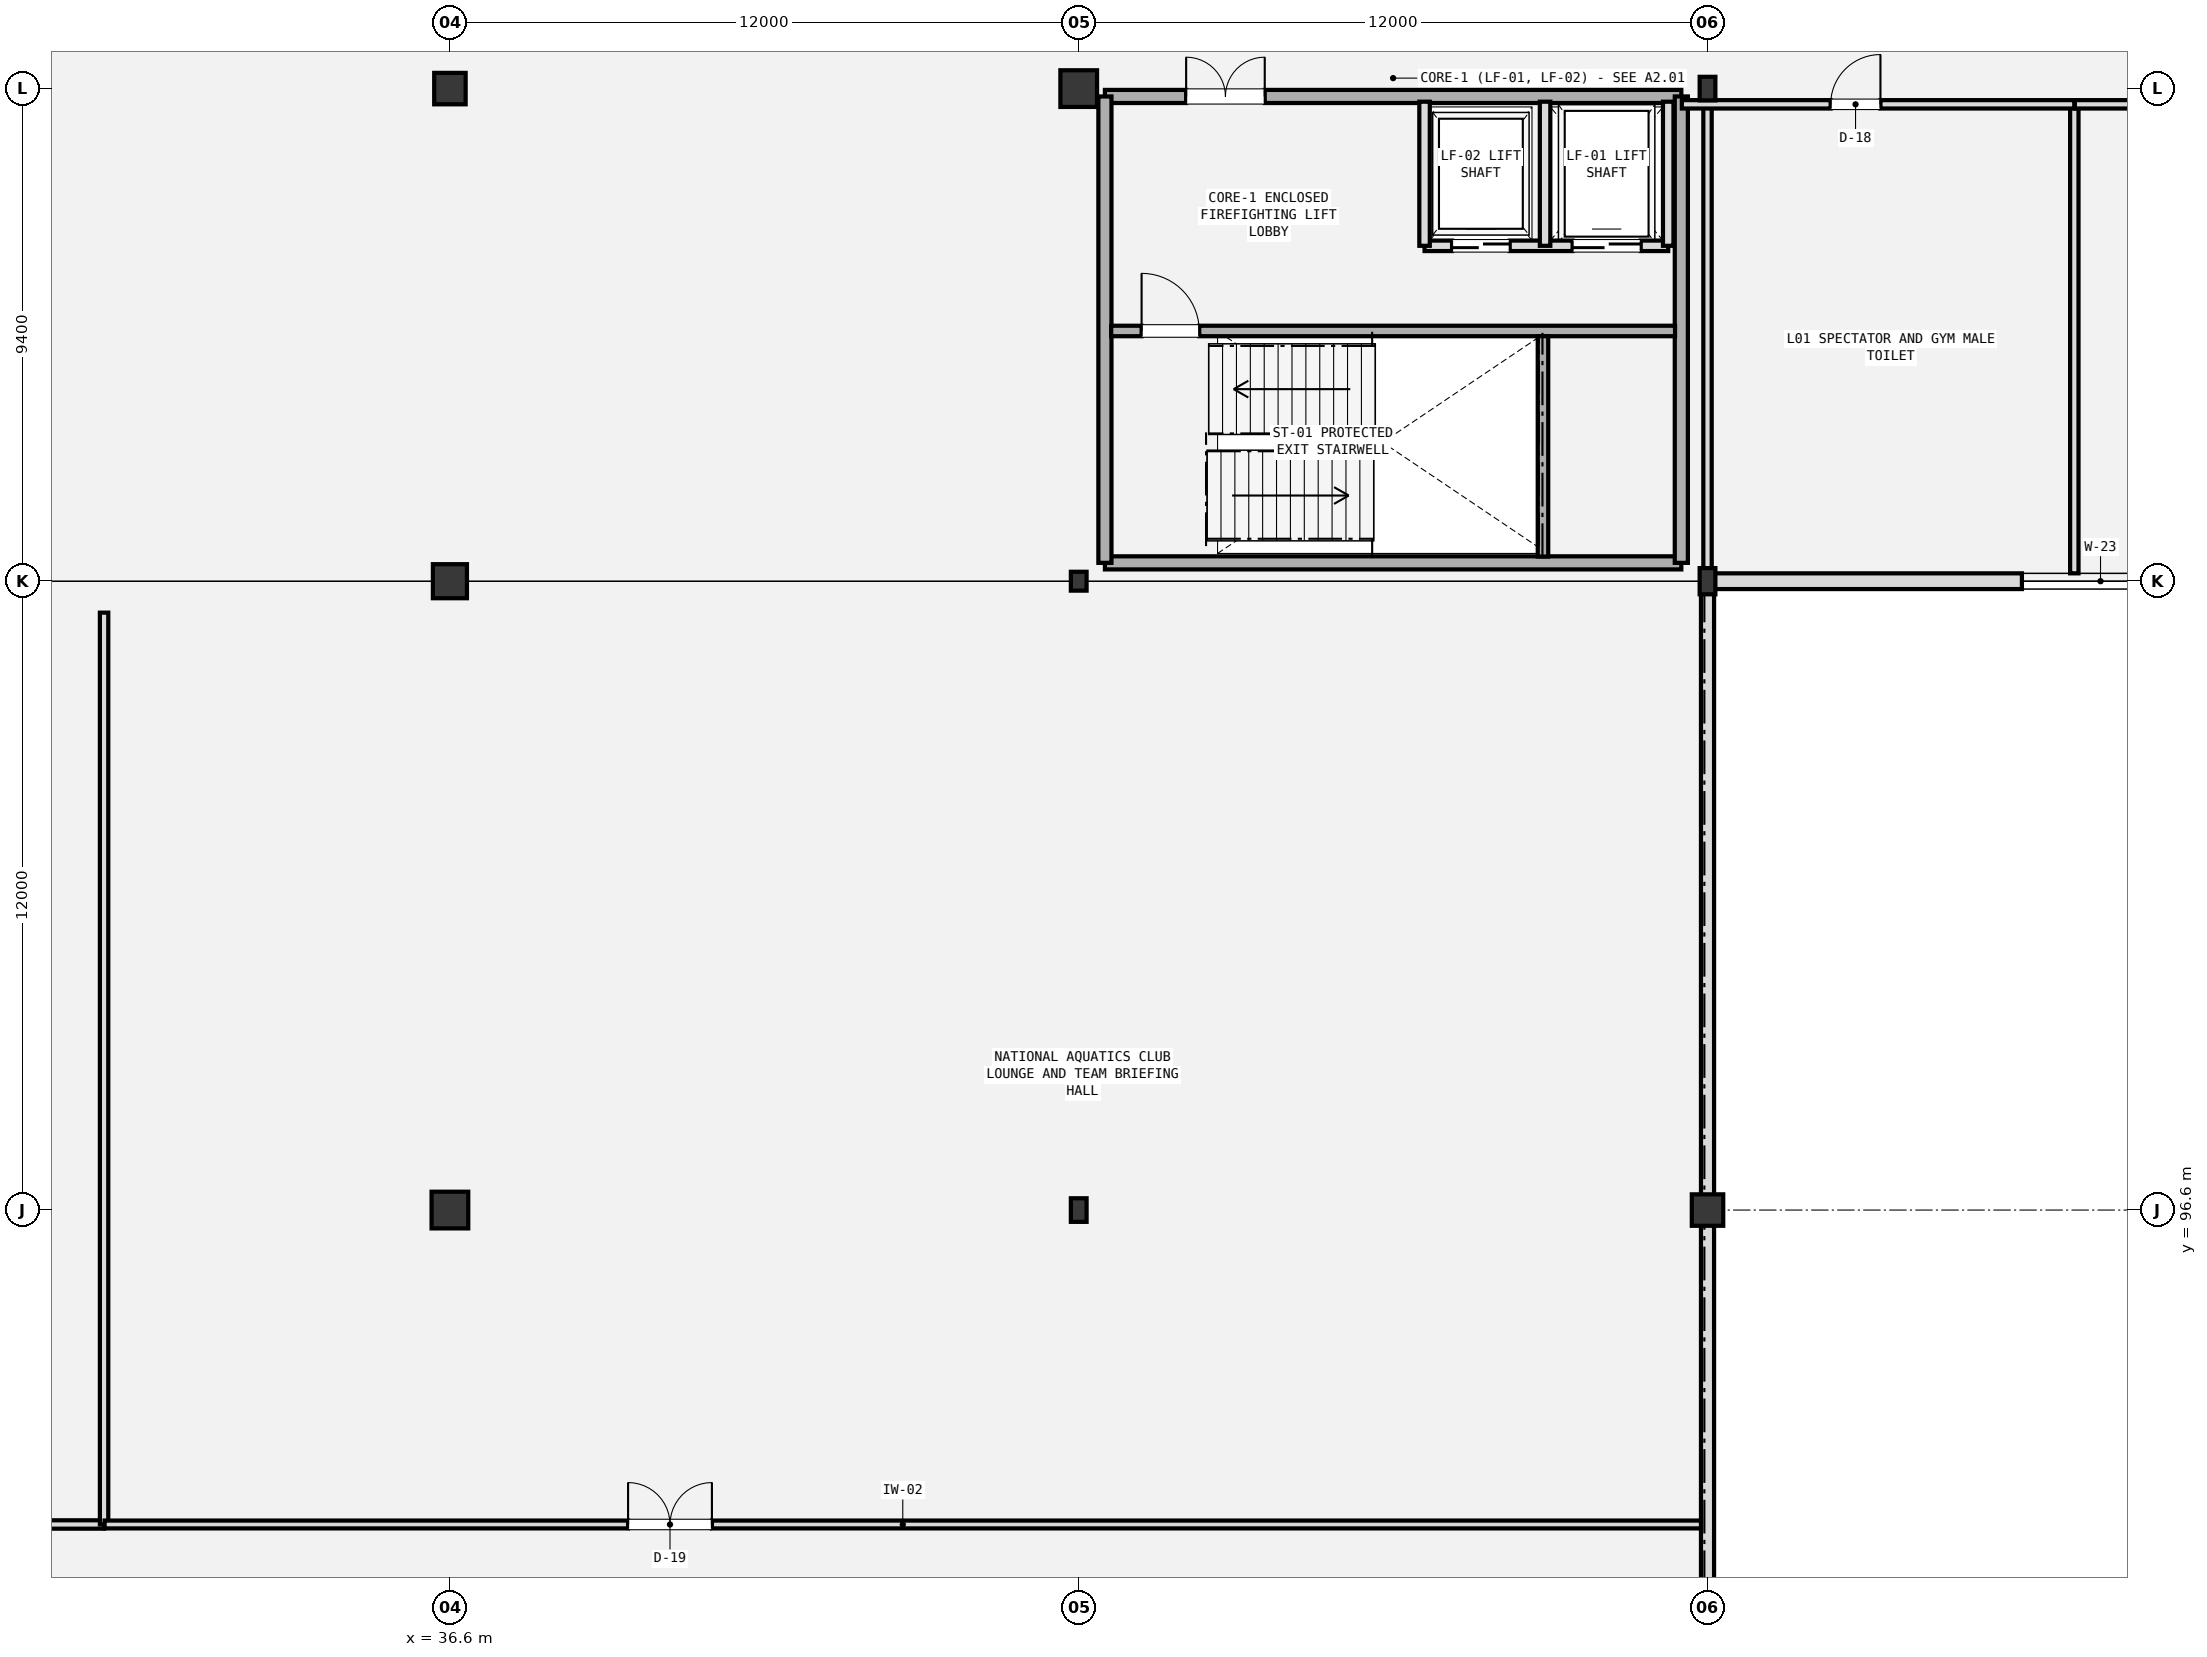
"""IFC4 building model, lengths in metres.
Left out: names, types, materials, properties, quantities, classifications, styles, units other than length and angle.
Written with IfcOpenShell. Run it as: python <this file> out.ifc"""

import sys

from ifc_helpers import new_model, si_unit, direction, frame, frame_2d, origin, origin_2d, place, context, subcontext, project, spatial, rectangle, i_section, extrude, element, fill, save


model = new_model("IFC4")
c1 = context("Model", 3, precision=1e-05, world=origin(), true_north=direction((0.0, 1.0)))
c2 = subcontext(c1, "Body", "Model", "MODEL_VIEW")
j1 = project(units=[si_unit("LENGTHUNIT", "METRE"), si_unit("PLANEANGLEUNIT", "RADIAN")], contexts=[c1])
p1 = place(None, origin())
s1 = spatial("IfcSite", under=j1, at=p1, CompositionType="ELEMENT")
p2 = place(p1, origin())
s2 = spatial("IfcBuilding", under=s1, at=p2, CompositionType="ELEMENT")
p3 = place(p2, frame((0.0, 0.0, 5.4)))
s3 = spatial("IfcBuildingStorey", under=s2, at=p3, CompositionType="ELEMENT", Elevation=5.4)
p4 = place(p3, frame((36.6, 96.6, 0.0), z_axis=(0.0, 0.0, 1.0), x_axis=(1.0, 0.0, 0.0)))
e1 = element("IfcColumn", 1, at=p4, inside=s3, PredefinedType="COLUMN", context=c2, shape_type="SweptSolid", body=[
    extrude(rectangle(XDim=0.7, YDim=0.7, at=origin_2d()), origin(), (0.0, 0.0, 1.0), 4.56),
])
p5 = place(p3, frame((36.6, 108.6, 0.0), z_axis=(0.0, 0.0, 1.0), x_axis=(1.0, 0.0, 0.0)))
e2 = element("IfcColumn", 2, at=p5, inside=s3, PredefinedType="COLUMN", context=c2, shape_type="SweptSolid", body=[
    extrude(rectangle(XDim=0.65, YDim=0.65, at=origin_2d()), origin(), (0.0, 0.0, 1.0), 4.2),
])
p6 = place(p3, frame((36.6, 118.0, 0.0), z_axis=(0.0, 0.0, 1.0), x_axis=(1.0, 0.0, 0.0)))
e3 = element("IfcColumn", 3, at=p6, inside=s3, PredefinedType="COLUMN", context=c2, shape_type="SweptSolid", body=[
    extrude(rectangle(XDim=0.6, YDim=0.6, at=origin_2d()), origin(), (0.0, 0.0, 1.0), 4.2),
])
p7 = place(p3, frame((48.6, 96.6, 0.0), z_axis=(0.0, 0.0, 1.0), x_axis=(1.0, 0.0, 0.0)))
e4 = element("IfcColumn", 4, at=p7, inside=s3, PredefinedType="COLUMN", context=c2, shape_type="SweptSolid", body=[
    extrude(i_section(OverallWidth=0.3, OverallDepth=0.45, WebThickness=0.014, FlangeThickness=0.026, FilletRadius=0.027, at=origin_2d()), origin(), (0.0, 0.0, 1.0), 4.56),
])
p8 = place(p3, frame((48.6, 108.6, 0.0), z_axis=(0.0, 0.0, 1.0), x_axis=(1.0, 0.0, 0.0)))
e5 = element("IfcColumn", 5, at=p8, inside=s3, PredefinedType="PILASTER", context=c2, shape_type="SweptSolid", body=[
    extrude(i_section(OverallWidth=0.3, OverallDepth=0.36, WebThickness=0.012, FlangeThickness=0.022, FilletRadius=0.027, at=origin_2d()), origin(), (0.0, 0.0, 1.0), 4.2),
])
p9 = place(p3, frame((48.6, 118.0, 0.0), z_axis=(0.0, 0.0, 1.0), x_axis=(1.0, 0.0, 0.0)))
e6 = element("IfcColumn", 6, at=p9, inside=s3, PredefinedType="COLUMN", context=c2, shape_type="SweptSolid", body=[
    extrude(rectangle(XDim=0.7, YDim=0.7, at=origin_2d()), origin(), (0.0, 0.0, 1.0), 4.2),
])
p10 = place(p3, frame((60.6, 96.6, 0.0), z_axis=(0.0, 0.0, 1.0), x_axis=(1.0, 0.0, 0.0)))
e7 = element("IfcColumn", 7, at=p10, inside=s3, PredefinedType="COLUMN", context=c2, shape_type="SweptSolid", body=[
    extrude(rectangle(XDim=0.6, YDim=0.6, at=origin_2d()), origin(), (0.0, 0.0, 1.0), 4.56),
])
p11 = place(p3, frame((60.6, 108.6, 0.0), z_axis=(0.0, 0.0, 1.0), x_axis=(1.0, 0.0, 0.0)))
e8 = element("IfcColumn", 8, at=p11, inside=s3, PredefinedType="COLUMN", context=c2, shape_type="SweptSolid", body=[
    extrude(i_section(OverallWidth=0.3, OverallDepth=0.5, WebThickness=0.014, FlangeThickness=0.028, FilletRadius=0.027, at=origin_2d()), origin(), (0.0, 0.0, 1.0), 4.2),
])
p12 = place(p3, frame((60.6, 118.0, 0.0), z_axis=(0.0, 0.0, 1.0), x_axis=(1.0, 0.0, 0.0)))
e9 = element("IfcColumn", 9, at=p12, inside=s3, PredefinedType="COLUMN", context=c2, shape_type="SweptSolid", body=[
    extrude(i_section(OverallWidth=0.3, OverallDepth=0.45, WebThickness=0.014, FlangeThickness=0.026, FilletRadius=0.027, at=origin_2d()), origin(), (0.0, 0.0, 1.0), 4.2),
])
p13 = place(p3, frame((60.6, 108.6, 0.0), z_axis=(0.0, 0.0, 1.0), x_axis=(1.0, 0.0, 0.0)))
e10 = element("IfcWall", 10, at=p13, inside=s3, PredefinedType="SOLIDWALL", context=c2, shape_type="SweptSolid", body=[
    extrude(rectangle(XDim=95.4, YDim=0.3, at=frame_2d((47.7, 0.0))), origin(), (0.0, 0.0, 1.0), 3.43),
])
p14 = place(p13, frame((6.0, 0.0, 0.85)))
e11 = element("IfcOpeningElement", 11, at=p14, cuts=e10, PredefinedType="OPENING", context=c2, shape_type="SweptSolid", body=[
    extrude(rectangle(XDim=3.0, YDim=1.65, at=frame_2d((1.5, 0.825))), frame((0.0, 0.16, 0.0), z_axis=(0.0, -1.0, 0.0), x_axis=(1.0, 0.0, 0.0)), (0.0, 0.0, 1.0), 0.32),
])
p15 = place(p13, frame((20.0, 0.0, 0.85)))
e12 = element("IfcOpeningElement", 12, at=p15, cuts=e10, PredefinedType="OPENING", context=c2, shape_type="SweptSolid", body=[
    extrude(rectangle(XDim=2.8, YDim=1.5, at=frame_2d((1.4, 0.75))), frame((0.0, 0.16, 0.0), z_axis=(0.0, -1.0, 0.0), x_axis=(1.0, 0.0, 0.0)), (0.0, 0.0, 1.0), 0.32),
])
p16 = place(p13, frame((54.0, 0.0, 0.85)))
e13 = element("IfcOpeningElement", 13, at=p16, cuts=e10, PredefinedType="OPENING", context=c2, shape_type="SweptSolid", body=[
    extrude(rectangle(XDim=4.4, YDim=1.4, at=frame_2d((2.2, 0.7))), frame((0.0, 0.16, 0.0), z_axis=(0.0, -1.0, 0.0), x_axis=(1.0, 0.0, 0.0)), (0.0, 0.0, 1.0), 0.32),
])
p17 = place(p13, frame((72.0, 0.0, 0.85)))
e14 = element("IfcOpeningElement", 14, at=p17, cuts=e10, PredefinedType="OPENING", context=c2, shape_type="SweptSolid", body=[
    extrude(rectangle(XDim=3.4, YDim=1.4, at=frame_2d((1.7, 0.7))), frame((0.0, 0.16, 0.0), z_axis=(0.0, -1.0, 0.0), x_axis=(1.0, 0.0, 0.0)), (0.0, 0.0, 1.0), 0.32),
])
p18 = place(p3, frame((60.6, 85.4, 4.88), z_axis=(0.0, 0.0, 1.0), x_axis=(0.0, 1.0, 0.0)))
e15 = element("IfcWall", 15, at=p18, inside=s3, PredefinedType="PARAPET", context=c2, shape_type="SweptSolid", body=[
    extrude(rectangle(XDim=23.2, YDim=0.25, at=frame_2d((11.6, 0.0))), origin(), (0.0, 0.0, 1.0), 1.15),
])
p19 = place(p3, frame((49.1, 108.95, 0.0), z_axis=(0.0, 0.0, 1.0), x_axis=(1.0, 0.0, 0.0)))
e16 = element("IfcWall", 16, at=p19, inside=s3, PredefinedType="SHEAR", context=c2, shape_type="SweptSolid", body=[
    extrude(rectangle(XDim=11.0, YDim=0.25, at=frame_2d((5.5, 0.0))), origin(), (0.0, 0.0, 1.0), 3.88),
])
p20 = place(p3, frame((49.1, 117.85, 0.0), z_axis=(0.0, 0.0, 1.0), x_axis=(1.0, 0.0, 0.0)))
e17 = element("IfcWall", 17, at=p20, inside=s3, PredefinedType="SHEAR", context=c2, shape_type="SweptSolid", body=[
    extrude(rectangle(XDim=11.0, YDim=0.25, at=frame_2d((5.5, 0.0))), origin(), (0.0, 0.0, 1.0), 3.88),
])
p21 = place(p20, frame((1.55, 0.0, 0.0)))
e18 = element("IfcOpeningElement", 18, at=p21, cuts=e17, PredefinedType="OPENING", context=c2, shape_type="SweptSolid", body=[
    extrude(rectangle(XDim=1.5, YDim=2.2, at=frame_2d((0.75, 1.1))), frame((0.0, 0.135, 0.0), z_axis=(0.0, -1.0, 0.0), x_axis=(1.0, 0.0, 0.0)), (0.0, 0.0, 1.0), 0.27),
])
for number, where, z_axis, x_axis in (
    (19, (49.1, 108.95, 0.0), (0.0, 0.0, 1.0), (0.0, 1.0, 0.0)),
    (20, (60.1, 108.95, 0.0), (0.0, 0.0, 1.0), (0.0, 1.0, 0.0)),
):
    element("IfcWall", number, at=place(p3, frame(where, z_axis=z_axis, x_axis=x_axis)), inside=s3, PredefinedType="SHEAR", context=c2, shape_type="SweptSolid", body=[
        extrude(rectangle(XDim=8.9, YDim=0.25, at=frame_2d((4.45, 0.0))), origin(), (0.0, 0.0, 1.0), 3.88),
    ])
p22 = place(p3, frame((49.22, 113.375, 0.0), z_axis=(0.0, 0.0, 1.0), x_axis=(1.0, 0.0, 0.0)))
e21 = element("IfcWall", 21, at=p22, inside=s3, PredefinedType="SHEAR", context=c2, shape_type="SweptSolid", body=[
    extrude(rectangle(XDim=10.76, YDim=0.2, at=frame_2d((5.38, 0.0))), origin(), (0.0, 0.0, 1.0), 3.88),
])
p23 = place(p22, frame((0.58, 0.0, 0.0)))
e22 = element("IfcOpeningElement", 22, at=p23, cuts=e21, PredefinedType="OPENING", context=c2, shape_type="SweptSolid", body=[
    extrude(rectangle(XDim=1.1, YDim=2.2, at=frame_2d((0.55, 1.1))), frame((0.0, 0.11, 0.0), z_axis=(0.0, -1.0, 0.0), x_axis=(1.0, 0.0, 0.0)), (0.0, 0.0, 1.0), 0.22),
])
p24 = place(p3, frame((57.46, 109.07, 0.0), z_axis=(0.0, 0.0, 1.0), x_axis=(0.0, 1.0, 0.0)))
e23 = element("IfcWall", 23, at=p24, inside=s3, PredefinedType="SHEAR", context=c2, shape_type="SweptSolid", body=[
    extrude(rectangle(XDim=4.205, YDim=0.2, at=frame_2d((2.103, 0.0))), origin(), (0.0, 0.0, 1.0), 3.88),
])
p25 = place(p3, frame((55.2, 115.0, 0.0), z_axis=(0.0, 0.0, 1.0), x_axis=(1.0, 0.0, 0.0)))
e24 = element("IfcWall", 24, at=p25, inside=s3, PredefinedType="SOLIDWALL", context=c2, shape_type="SweptSolid", body=[
    extrude(rectangle(XDim=4.65, YDim=0.2, at=frame_2d((2.325, 0.0))), origin(), (0.0, 0.0, 1.0), 3.67),
])
p26 = place(p25, frame((2.825, 0.0, 0.0)))
e25 = element("IfcOpeningElement", 25, at=p26, cuts=e24, PredefinedType="OPENING", context=c2, shape_type="SweptSolid", body=[
    extrude(rectangle(XDim=1.3, YDim=2.3, at=frame_2d((0.65, 1.15))), frame((0.0, 0.11, 0.0), z_axis=(0.0, -1.0, 0.0), x_axis=(1.0, 0.0, 0.0)), (0.0, 0.0, 1.0), 0.22),
])
p27 = place(p25, frame((0.525, 0.0, 0.0)))
e26 = element("IfcOpeningElement", 26, at=p27, cuts=e24, PredefinedType="OPENING", context=c2, shape_type="SweptSolid", body=[
    extrude(rectangle(XDim=1.1, YDim=2.2, at=frame_2d((0.55, 1.1))), frame((0.0, 0.11, 0.0), z_axis=(0.0, -1.0, 0.0), x_axis=(1.0, 0.0, 0.0)), (0.0, 0.0, 1.0), 0.22),
])
for number, where, z_axis, x_axis in (
    (27, (57.5, 115.0, 0.0), (0.0, 0.0, 1.0), (0.0, 1.0, 0.0)),
    (28, (59.85, 115.0, 0.0), (0.0, 0.0, 1.0), (0.0, 1.0, 0.0)),
    (29, (55.2, 115.0, 0.0), (0.0, 0.0, 1.0), (0.0, 1.0, 0.0)),
):
    element("IfcWall", number, at=place(p3, frame(where, z_axis=z_axis, x_axis=x_axis)), inside=s3, PredefinedType="SOLIDWALL", context=c2, shape_type="SweptSolid", body=[
        extrude(rectangle(XDim=2.75, YDim=0.2, at=frame_2d((1.375, 0.0))), origin(), (0.0, 0.0, 1.0), 3.88),
    ])
p28 = place(p3, frame((2.0, 90.6, 0.0), z_axis=(0.0, 0.0, 1.0), x_axis=(1.0, 0.0, 0.0)))
e30 = element("IfcWall", 30, at=p28, inside=s3, PredefinedType="PLUMBINGWALL", context=c2, shape_type="SweptSolid", body=[
    extrude(rectangle(XDim=28.0, YDim=0.16, at=frame_2d((14.0, 0.0))), origin(), (0.0, 0.0, 1.0), 2.85),
])
p29 = place(p28, frame((12.0, 0.0, 0.0)))
e31 = element("IfcOpeningElement", 31, at=p29, cuts=e30, PredefinedType="OPENING", context=c2, shape_type="SweptSolid", body=[
    extrude(rectangle(XDim=1.0, YDim=2.2, at=frame_2d((0.5, 1.1))), frame((0.0, 0.09, 0.0), z_axis=(0.0, -1.0, 0.0), x_axis=(1.0, 0.0, 0.0)), (0.0, 0.0, 1.0), 0.18),
])
p30 = place(p3, frame((30.0, 90.6, 0.0), z_axis=(0.0, 0.0, 1.0), x_axis=(0.0, 1.0, 0.0)))
e32 = element("IfcWall", 32, at=p30, inside=s3, PredefinedType="PLUMBINGWALL", context=c2, shape_type="SweptSolid", body=[
    extrude(rectangle(XDim=17.4, YDim=0.16, at=frame_2d((8.7, 0.0))), origin(), (0.0, 0.0, 1.0), 2.85),
])
p31 = place(p3, frame((30.01, 90.6, 0.0), z_axis=(0.0, 0.0, 1.0), x_axis=(1.0, 0.0, 0.0)))
e33 = element("IfcWall", 33, at=p31, inside=s3, PredefinedType="PARTITIONING", context=c2, shape_type="SweptSolid", body=[
    extrude(rectangle(XDim=30.465, YDim=0.15, at=frame_2d((15.232, 0.0))), origin(), (0.0, 0.0, 1.0), 2.85),
])
p32 = place(p31, frame((9.99, 0.0, 0.0)))
e34 = element("IfcOpeningElement", 34, at=p32, cuts=e33, PredefinedType="OPENING", context=c2, shape_type="SweptSolid", body=[
    extrude(rectangle(XDim=1.6, YDim=2.2, at=frame_2d((0.8, 1.1))), frame((0.0, 0.085, 0.0), z_axis=(0.0, -1.0, 0.0), x_axis=(1.0, 0.0, 0.0)), (0.0, 0.0, 1.0), 0.17),
])
for number, where, z_axis, x_axis in (
    (35, (60.6, 108.75, 0.0), (0.0, 0.0, 1.0), (0.0, 1.0, 0.0)),
    (36, (67.6, 108.75, 0.0), (0.0, 0.0, 1.0), (0.0, 1.0, 0.0)),
):
    element("IfcWall", number, at=place(p3, frame(where, z_axis=z_axis, x_axis=x_axis)), inside=s3, PredefinedType="PLUMBINGWALL", context=c2, shape_type="SweptSolid", body=[
        extrude(rectangle(XDim=8.95, YDim=0.16, at=frame_2d((4.475, 0.0))), origin(), (0.0, 0.0, 1.0), 2.7),
    ])
p33 = place(p3, frame((60.11, 117.7, 0.0), z_axis=(0.0, 0.0, 1.0), x_axis=(1.0, 0.0, 0.0)))
e37 = element("IfcWall", 37, at=p33, inside=s3, PredefinedType="PLUMBINGWALL", context=c2, shape_type="SweptSolid", body=[
    extrude(rectangle(XDim=7.49, YDim=0.16, at=frame_2d((3.745, 0.0))), origin(), (0.0, 0.0, 1.0), 2.7),
])
p34 = place(p33, frame((2.84, 0.0, 0.0)))
e38 = element("IfcOpeningElement", 38, at=p34, cuts=e37, PredefinedType="OPENING", context=c2, shape_type="SweptSolid", body=[
    extrude(rectangle(XDim=0.95, YDim=2.15, at=frame_2d((0.475, 1.075))), frame((0.0, 0.09, 0.0), z_axis=(0.0, -1.0, 0.0), x_axis=(1.0, 0.0, 0.0)), (0.0, 0.0, 1.0), 0.18),
])
p35 = place(p3, frame((67.61, 117.7, 0.0), z_axis=(0.0, 0.0, 1.0), x_axis=(1.0, 0.0, 0.0)))
e39 = element("IfcWall", 39, at=p35, inside=s3, PredefinedType="PLUMBINGWALL", context=c2, shape_type="SweptSolid", body=[
    extrude(rectangle(XDim=7.39, YDim=0.16, at=frame_2d((3.695, 0.0))), origin(), (0.0, 0.0, 1.0), 2.7),
])
p36 = place(p35, frame((2.99, 0.0, 0.0)))
e40 = element("IfcOpeningElement", 40, at=p36, cuts=e39, PredefinedType="OPENING", context=c2, shape_type="SweptSolid", body=[
    extrude(rectangle(XDim=0.95, YDim=2.15, at=frame_2d((0.475, 1.075))), frame((0.0, 0.09, 0.0), z_axis=(0.0, -1.0, 0.0), x_axis=(1.0, 0.0, 0.0)), (0.0, 0.0, 1.0), 0.18),
])
p37 = place(p14, frame((3.0, 0.0, 0.0), z_axis=(0.0, 0.0, 1.0), x_axis=(-1.0, 0.0, 0.0)))
e41 = element("IfcWindow", 41, at=p37, inside=s3, PartitioningType="DOUBLE_PANEL_HORIZONTAL", PredefinedType="WINDOW", context=c2, shape_type="SweptSolid", body=[
    extrude(rectangle(XDim=3.0, YDim=1.65, at=frame_2d((1.5, 0.825))), frame((0.0, 0.03, 0.0), z_axis=(0.0, -1.0, 0.0), x_axis=(1.0, 0.0, 0.0)), (0.0, 0.0, 1.0), 0.06),
])
fill(e11, e41)
p38 = place(p21, origin())
e42 = element("IfcDoor", 42, at=p38, inside=s3, OperationType="DOUBLE_DOOR_SINGLE_SWING", PredefinedType="DOOR", context=c2, shape_type="SweptSolid", body=[
    extrude(rectangle(XDim=1.5, YDim=2.2, at=frame_2d((0.75, 1.1))), frame((0.0, 0.025, 0.0), z_axis=(0.0, -1.0, 0.0), x_axis=(1.0, 0.0, 0.0)), (0.0, 0.0, 1.0), 0.05),
])
fill(e18, e42)
p39 = place(p23, origin())
e43 = element("IfcDoor", 43, at=p39, inside=s3, OperationType="SINGLE_SWING_LEFT", PredefinedType="DOOR", context=c2, shape_type="SweptSolid", body=[
    extrude(rectangle(XDim=1.1, YDim=2.2, at=frame_2d((0.55, 1.1))), frame((0.0, 0.025, 0.0), z_axis=(0.0, -1.0, 0.0), x_axis=(1.0, 0.0, 0.0)), (0.0, 0.0, 1.0), 0.05),
])
fill(e22, e43)
p40 = place(p26, frame((1.3, 0.0, 0.0), z_axis=(0.0, 0.0, 1.0), x_axis=(-1.0, 0.0, 0.0)))
e44 = element("IfcDoor", 44, at=p40, inside=s3, OperationType="DOUBLE_DOOR_SLIDING", PredefinedType="DOOR", context=c2, shape_type="SweptSolid", body=[
    extrude(rectangle(XDim=1.3, YDim=2.3, at=frame_2d((0.65, 1.15))), frame((0.0, 0.025, 0.0), z_axis=(0.0, -1.0, 0.0), x_axis=(1.0, 0.0, 0.0)), (0.0, 0.0, 1.0), 0.05),
])
fill(e25, e44)
p41 = place(p27, frame((1.1, 0.0, 0.0), z_axis=(0.0, 0.0, 1.0), x_axis=(-1.0, 0.0, 0.0)))
e45 = element("IfcDoor", 45, at=p41, inside=s3, OperationType="DOUBLE_DOOR_SLIDING", PredefinedType="DOOR", context=c2, shape_type="SweptSolid", body=[
    extrude(rectangle(XDim=1.1, YDim=2.2, at=frame_2d((0.55, 1.1))), frame((0.0, 0.025, 0.0), z_axis=(0.0, -1.0, 0.0), x_axis=(1.0, 0.0, 0.0)), (0.0, 0.0, 1.0), 0.05),
])
fill(e26, e45)
p42 = place(p32, origin())
e46 = element("IfcDoor", 46, at=p42, inside=s3, OperationType="DOUBLE_DOOR_SINGLE_SWING", PredefinedType="DOOR", context=c2, shape_type="SweptSolid", body=[
    extrude(rectangle(XDim=1.6, YDim=2.2, at=frame_2d((0.8, 1.1))), frame((0.0, 0.025, 0.0), z_axis=(0.0, -1.0, 0.0), x_axis=(1.0, 0.0, 0.0)), (0.0, 0.0, 1.0), 0.05),
])
fill(e34, e46)
p43 = place(p34, origin())
e47 = element("IfcDoor", 47, at=p43, inside=s3, OperationType="SINGLE_SWING_RIGHT", PredefinedType="DOOR", context=c2, shape_type="SweptSolid", body=[
    extrude(rectangle(XDim=0.95, YDim=2.15, at=frame_2d((0.475, 1.075))), frame((0.0, 0.025, 0.0), z_axis=(0.0, -1.0, 0.0), x_axis=(1.0, 0.0, 0.0)), (0.0, 0.0, 1.0), 0.05),
])
fill(e38, e47)
save(model, sys.argv[1])
